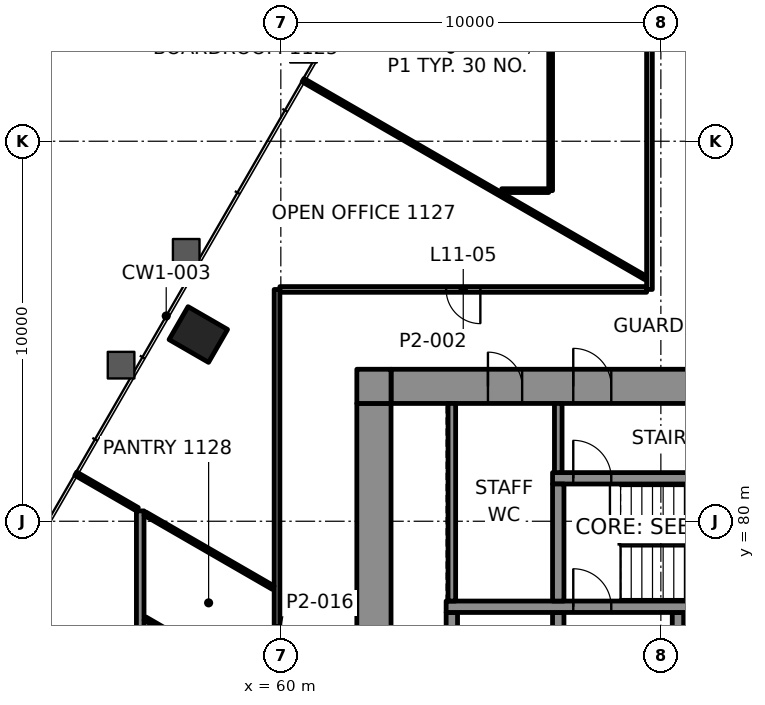
"""IFC4 building model, lengths in metres.
Left out: names, types, materials, properties, quantities, classifications, styles, units other than length and angle.
Written with IfcOpenShell. Run it as: python <this file> out.ifc"""

import sys

from ifc_helpers import new_model, si_unit, direction, frame, frame_2d, origin, origin_2d, place, context, subcontext, project, spatial, rectangle, extrude, element, fill, save


model = new_model("IFC4")
c1 = context("Model", 3, precision=1e-05, world=origin(), true_north=direction((0.0, 1.0)))
c2 = subcontext(c1, "Body", "Model", "MODEL_VIEW")
j1 = project(units=[si_unit("LENGTHUNIT", "METRE"), si_unit("PLANEANGLEUNIT", "RADIAN")], contexts=[c1])
p1 = place(None, origin())
s1 = spatial("IfcSite", under=j1, at=p1, CompositionType="ELEMENT")
p2 = place(p1, origin())
s2 = spatial("IfcBuilding", under=s1, at=p2, CompositionType="ELEMENT")
p3 = place(p2, frame((0.0, 0.0, 52.6)))
s3 = spatial("IfcBuildingStorey", under=s2, at=p3, CompositionType="ELEMENT", Elevation=52.6)
p4 = place(p3, frame((57.829, 84.914, -0.0), z_axis=(0.0, 0.0, 1.0), x_axis=(-0.5, -0.866025403784, 0.0)))
e1 = element("IfcColumn", 1, at=p4, inside=s3, PredefinedType="COLUMN", context=c2, shape_type="SweptSolid", body=[
    extrude(rectangle(XDim=1.0, YDim=1.2, at=origin_2d()), origin(), (0.0, 0.0, 1.0), 4.2),
])
p5 = place(p3, frame((62.9, 83.55, 0.0), z_axis=(0.0, 0.0, 1.0), x_axis=(1.0, 0.0, 0.0)))
e2 = element("IfcWall", 2, at=p5, inside=s3, PredefinedType="SHEAR", context=c2, shape_type="SweptSolid", body=[
    extrude(rectangle(XDim=25.1, YDim=0.9, at=frame_2d((12.55, 0.0))), origin(), (0.0, 0.0, 1.0), 4.0),
])
p6 = place(p5, frame((4.795, 0.0, 0.0)))
e3 = element("IfcOpeningElement", 3, at=p6, cuts=e2, PredefinedType="OPENING", context=c2, shape_type="SweptSolid", body=[
    extrude(rectangle(XDim=1.0, YDim=2.1, at=frame_2d((0.5, 1.05))), frame((0.0, 0.46, 0.0), z_axis=(0.0, -1.0, 0.0), x_axis=(1.0, 0.0, 0.0)), (0.0, 0.0, 1.0), 0.92),
])
p7 = place(p5, frame((18.605, 0.0, 0.0)))
e4 = element("IfcOpeningElement", 4, at=p7, cuts=e2, PredefinedType="OPENING", context=c2, shape_type="SweptSolid", body=[
    extrude(rectangle(XDim=1.0, YDim=2.1, at=frame_2d((0.5, 1.05))), frame((0.0, 0.46, 0.0), z_axis=(0.0, -1.0, 0.0), x_axis=(1.0, 0.0, 0.0)), (0.0, 0.0, 1.0), 0.92),
])
p8 = place(p5, frame((2.55, 0.0, 0.0)))
e5 = element("IfcOpeningElement", 5, at=p8, cuts=e2, PredefinedType="OPENING", context=c2, shape_type="SweptSolid", body=[
    extrude(rectangle(XDim=0.9, YDim=2.1, at=frame_2d((0.45, 1.05))), frame((0.0, 0.46, 0.0), z_axis=(0.0, -1.0, 0.0), x_axis=(1.0, 0.0, 0.0)), (0.0, 0.0, 1.0), 0.92),
])
p9 = place(p5, frame((11.75, 0.0, 0.0)))
e6 = element("IfcOpeningElement", 6, at=p9, cuts=e2, PredefinedType="OPENING", context=c2, shape_type="SweptSolid", body=[
    extrude(rectangle(XDim=0.9, YDim=2.1, at=frame_2d((0.45, 1.05))), frame((0.0, 0.46, 0.0), z_axis=(0.0, -1.0, 0.0), x_axis=(1.0, 0.0, 0.0)), (0.0, 0.0, 1.0), 0.92),
])
p10 = place(p5, frame((21.65, 0.0, 0.0)))
e7 = element("IfcOpeningElement", 7, at=p10, cuts=e2, PredefinedType="OPENING", context=c2, shape_type="SweptSolid", body=[
    extrude(rectangle(XDim=0.9, YDim=2.1, at=frame_2d((0.45, 1.05))), frame((0.0, 0.46, 0.0), z_axis=(0.0, -1.0, 0.0), x_axis=(1.0, 0.0, 0.0)), (0.0, 0.0, 1.0), 0.92),
])
p11 = place(p3, frame((62.45, 66.9, 0.0), z_axis=(0.0, 0.0, 1.0), x_axis=(0.0, 1.0, 0.0)))
e8 = element("IfcWall", 8, at=p11, inside=s3, PredefinedType="SHEAR", context=c2, shape_type="SweptSolid", body=[
    extrude(rectangle(XDim=16.2, YDim=0.9, at=frame_2d((8.1, 0.0))), origin(), (0.0, 0.0, 1.0), 4.0),
])
p12 = place(p11, frame((5.5, 0.0, 0.0)))
e9 = element("IfcOpeningElement", 9, at=p12, cuts=e8, PredefinedType="OPENING", context=c2, shape_type="SweptSolid", body=[
    extrude(rectangle(XDim=1.8, YDim=2.1, at=frame_2d((0.9, 1.05))), frame((0.0, 0.46, 0.0), z_axis=(0.0, -1.0, 0.0), x_axis=(1.0, 0.0, 0.0)), (0.0, 0.0, 1.0), 0.92),
])
for number, where, z_axis, x_axis in (
    (10, (64.5, 75.0, 0.0), (0.0, 0.0, 1.0), (0.0, 1.0, 0.0)),
    (11, (67.3, 75.0, 0.0), (0.0, 0.0, 1.0), (0.0, 1.0, 0.0)),
):
    element("IfcWall", number, at=place(p3, frame(where, z_axis=z_axis, x_axis=x_axis)), inside=s3, PredefinedType="SHEAR", context=c2, shape_type="SweptSolid", body=[
        extrude(rectangle(XDim=2.6, YDim=0.3, at=frame_2d((1.3, 0.0))), origin(), (0.0, 0.0, 1.0), 4.0),
    ])
p13 = place(p3, frame((70.45, 75.0, 0.0), z_axis=(0.0, 0.0, 1.0), x_axis=(0.0, 1.0, 0.0)))
e12 = element("IfcWall", 12, at=p13, inside=s3, PredefinedType="SHEAR", context=c2, shape_type="SweptSolid", body=[
    extrude(rectangle(XDim=2.6, YDim=0.3, at=frame_2d((1.3, 0.0))), origin(), (0.0, 0.0, 1.0), 4.0),
])
p14 = place(p13, frame((0.15, 0.0, 0.0)))
e13 = element("IfcOpeningElement", 13, at=p14, cuts=e12, PredefinedType="OPENING", context=c2, shape_type="SweptSolid", body=[
    extrude(rectangle(XDim=1.1, YDim=2.1, at=frame_2d((0.55, 1.05))), frame((0.0, 0.16, 0.0), z_axis=(0.0, -1.0, 0.0), x_axis=(1.0, 0.0, 0.0)), (0.0, 0.0, 1.0), 0.32),
])
p15 = place(p3, frame((64.35, 77.75, 0.0), z_axis=(0.0, 0.0, 1.0), x_axis=(1.0, 0.0, 0.0)))
e14 = element("IfcWall", 14, at=p15, inside=s3, PredefinedType="SHEAR", context=c2, shape_type="SweptSolid", body=[
    extrude(rectangle(XDim=22.75, YDim=0.3, at=frame_2d((11.375, 0.0))), origin(), (0.0, 0.0, 1.0), 4.0),
])
p16 = place(p15, frame((3.345, 0.0, 0.0)))
e15 = element("IfcOpeningElement", 15, at=p16, cuts=e14, PredefinedType="OPENING", context=c2, shape_type="SweptSolid", body=[
    extrude(rectangle(XDim=1.0, YDim=2.1, at=frame_2d((0.5, 1.05))), frame((0.0, 0.16, 0.0), z_axis=(0.0, -1.0, 0.0), x_axis=(1.0, 0.0, 0.0)), (0.0, 0.0, 1.0), 0.32),
])
p17 = place(p3, frame((67.15, 81.13, 0.0), z_axis=(0.0, 0.0, 1.0), x_axis=(1.0, 0.0, 0.0)))
e16 = element("IfcWall", 16, at=p17, inside=s3, PredefinedType="SHEAR", context=c2, shape_type="SweptSolid", body=[
    extrude(rectangle(XDim=6.91, YDim=0.3, at=frame_2d((3.455, 0.0))), origin(), (0.0, 0.0, 1.0), 4.0),
])
p18 = place(p17, frame((0.545, 0.0, 0.0)))
e17 = element("IfcOpeningElement", 17, at=p18, cuts=e16, PredefinedType="OPENING", context=c2, shape_type="SweptSolid", body=[
    extrude(rectangle(XDim=1.0, YDim=2.1, at=frame_2d((0.5, 1.05))), frame((0.0, 0.16, 0.0), z_axis=(0.0, -1.0, 0.0), x_axis=(1.0, 0.0, 0.0)), (0.0, 0.0, 1.0), 0.32),
])
p19 = place(p3, frame((67.3, 77.9, 0.0), z_axis=(0.0, 0.0, 1.0), x_axis=(0.0, 1.0, 0.0)))
e18 = element("IfcWall", 18, at=p19, inside=s3, PredefinedType="SHEAR", context=c2, shape_type="SweptSolid", body=[
    extrude(rectangle(XDim=3.08, YDim=0.3, at=frame_2d((1.54, 0.0))), origin(), (0.0, 0.0, 1.0), 4.0),
])
p20 = place(p3, frame((62.0, 83.55, 0.0), z_axis=(0.0, 0.0, 1.0), x_axis=(1.0, 0.0, 0.0)))
e19 = element("IfcWall", 19, at=p20, inside=s3, PredefinedType="SHEAR", context=c2, shape_type="SweptSolid", body=[
    extrude(rectangle(XDim=0.9, YDim=0.9, at=frame_2d((0.45, 0.0))), origin(), (0.0, 0.0, 1.0), 4.0),
])
p21 = place(p3, frame((69.625, 86.1, 0.0), z_axis=(0.0, 0.0, 1.0), x_axis=(-1.0, 0.0, 0.0)))
e20 = element("IfcWall", 20, at=p21, inside=s3, PredefinedType="PARTITIONING", context=c2, shape_type="SweptSolid", body=[
    extrude(rectangle(XDim=9.649, YDim=0.15, at=frame_2d((4.825, 0.0))), origin(), (0.0, 0.0, 1.0), 3.4),
])
p22 = place(p21, frame((4.375, 0.0, 0.0)))
e21 = element("IfcOpeningElement", 21, at=p22, cuts=e20, PredefinedType="OPENING", context=c2, shape_type="SweptSolid", body=[
    extrude(rectangle(XDim=0.9, YDim=2.1, at=frame_2d((0.45, 1.05))), frame((0.0, 0.085, 0.0), z_axis=(0.0, -1.0, 0.0), x_axis=(1.0, 0.0, 0.0)), (0.0, 0.0, 1.0), 0.17),
])
p23 = place(p3, frame((65.812, 88.7, 0.0), z_axis=(0.0, 0.0, 1.0), x_axis=(1.0, 0.0, 0.0)))
e22 = element("IfcWall", 22, at=p23, inside=s3, PredefinedType="PARTITIONING", context=c2, shape_type="SweptSolid", body=[
    extrude(rectangle(XDim=1.238, YDim=0.1, at=frame_2d((0.619, 0.0))), origin(), (0.0, 0.0, 1.0), 3.4),
])
p24 = place(p3, frame((69.7, 86.1, 0.0), z_axis=(0.0, 0.0, 1.0), x_axis=(0.0, 1.0, 0.0)))
e23 = element("IfcWall", 23, at=p24, inside=s3, PredefinedType="PARTITIONING", context=c2, shape_type="SweptSolid", body=[
    extrude(rectangle(XDim=10.6, YDim=0.15, at=frame_2d((5.3, 0.0))), origin(), (0.0, 0.0, 1.0), 3.4),
])
p25 = place(p3, frame((67.1, 88.7, 0.0), z_axis=(0.0, 0.0, 1.0), x_axis=(0.0, 1.0, 0.0)))
e24 = element("IfcWall", 24, at=p25, inside=s3, PredefinedType="PARTITIONING", context=c2, shape_type="SweptSolid", body=[
    extrude(rectangle(XDim=10.6, YDim=0.1, at=frame_2d((5.3, 0.0))), origin(), (0.0, 0.0, 1.0), 3.4),
])
p26 = place(p3, frame((59.9, 67.321, 0.0), z_axis=(0.0, 0.0, 1.0), x_axis=(0.0, 1.0, 0.0)))
e25 = element("IfcWall", 25, at=p26, inside=s3, PredefinedType="PARTITIONING", context=c2, shape_type="SweptSolid", body=[
    extrude(rectangle(XDim=18.778, YDim=0.15, at=frame_2d((9.389, 0.0))), origin(), (0.0, 0.0, 1.0), 3.4),
])
p27 = place(p26, frame((3.519, 0.0, 0.0)))
e26 = element("IfcOpeningElement", 26, at=p27, cuts=e25, PredefinedType="OPENING", context=c2, shape_type="SweptSolid", body=[
    extrude(rectangle(XDim=0.9, YDim=2.1, at=frame_2d((0.45, 1.05))), frame((0.0, 0.085, 0.0), z_axis=(0.0, -1.0, 0.0), x_axis=(1.0, 0.0, 0.0)), (0.0, 0.0, 1.0), 0.17),
])
p28 = place(p26, frame((6.281, 0.0, 0.0)))
e27 = element("IfcOpeningElement", 27, at=p28, cuts=e25, PredefinedType="OPENING", context=c2, shape_type="SweptSolid", body=[
    extrude(rectangle(XDim=0.9, YDim=2.1, at=frame_2d((0.45, 1.05))), frame((0.0, 0.085, 0.0), z_axis=(0.0, -1.0, 0.0), x_axis=(1.0, 0.0, 0.0)), (0.0, 0.0, 1.0), 0.17),
])
p29 = place(p26, frame((9.042, 0.0, 0.0)))
e28 = element("IfcOpeningElement", 28, at=p29, cuts=e25, PredefinedType="OPENING", context=c2, shape_type="SweptSolid", body=[
    extrude(rectangle(XDim=0.9, YDim=2.1, at=frame_2d((0.45, 1.05))), frame((0.0, 0.085, 0.0), z_axis=(0.0, -1.0, 0.0), x_axis=(1.0, 0.0, 0.0)), (0.0, 0.0, 1.0), 0.17),
])
p30 = place(p3, frame((56.3, 71.988, 0.0), z_axis=(0.0, 0.0, 1.0), x_axis=(0.0, 1.0, 0.0)))
e29 = element("IfcWall", 29, at=p30, inside=s3, PredefinedType="PARTITIONING", context=c2, shape_type="SweptSolid", body=[
    extrude(rectangle(XDim=8.284, YDim=0.2, at=frame_2d((4.142, 0.0))), origin(), (0.0, 0.0, 1.0), 3.4),
])
p31 = place(p3, frame((69.599, 86.404, 0.0), z_axis=(0.0, 0.0, 1.0), x_axis=(-0.866034815185, 0.499983698621, 0.0)))
e30 = element("IfcWall", 30, at=p31, inside=s3, PredefinedType="PARTITIONING", context=c2, shape_type="SweptSolid", body=[
    extrude(rectangle(XDim=10.408, YDim=0.1, at=frame_2d((5.204, 0.0))), origin(), (0.0, 0.0, 1.0), 3.165),
])
p32 = place(p3, frame((59.799, 78.252, 0.0), z_axis=(0.0, 0.0, 1.0), x_axis=(-0.866036349784, 0.499981040493, 0.0)))
e31 = element("IfcWall", 31, at=p32, inside=s3, PredefinedType="PARTITIONING", context=c2, shape_type="SweptSolid", body=[
    extrude(rectangle(XDim=3.896, YDim=0.1, at=frame_2d((1.948, 0.0))), origin(), (0.0, 0.0, 1.0), 3.4),
])
p33 = place(p3, frame((59.799, 75.49, 0.0), z_axis=(0.0, 0.0, 1.0), x_axis=(-0.866043624834, 0.499968438888, 0.0)))
e32 = element("IfcWall", 32, at=p33, inside=s3, PredefinedType="PARTITIONING", context=c2, shape_type="SweptSolid", body=[
    extrude(rectangle(XDim=3.895, YDim=0.1, at=frame_2d((1.947, 0.0))), origin(), (0.0, 0.0, 1.0), 3.4),
])
p34 = place(p3, frame((56.225, 80.316, 0.0), z_axis=(0.0, 0.0, 1.0), x_axis=(-0.86600952399, 0.500027503603, 0.0)))
e33 = element("IfcWall", 33, at=p34, inside=s3, PredefinedType="PARTITIONING", context=c2, shape_type="SweptSolid", body=[
    extrude(rectangle(XDim=1.871, YDim=0.1, at=frame_2d((0.935, 0.0))), origin(), (0.0, 0.0, 1.0), 3.165),
])
p35 = place(p3, frame((64.5, 77.9, 0.0), z_axis=(0.0, 0.0, 1.0), x_axis=(0.0, 1.0, 0.0)))
e34 = element("IfcWall", 34, at=p35, inside=s3, PredefinedType="PARTITIONING", context=c2, shape_type="SweptSolid", body=[
    extrude(rectangle(XDim=5.2, YDim=0.2, at=frame_2d((2.6, 0.0))), origin(), (0.0, 0.0, 1.0), 4.0),
])
p36 = place(p3, frame((67.3, 81.28, 0.0), z_axis=(0.0, 0.0, 1.0), x_axis=(0.0, 1.0, 0.0)))
e35 = element("IfcWall", 35, at=p36, inside=s3, PredefinedType="PARTITIONING", context=c2, shape_type="SweptSolid", body=[
    extrude(rectangle(XDim=1.82, YDim=0.2, at=frame_2d((0.91, 0.0))), origin(), (0.0, 0.0, 1.0), 4.0),
])
p37 = place(p22, origin())
e36 = element("IfcDoor", 36, at=p37, inside=s3, OperationType="SINGLE_SWING_LEFT", PredefinedType="DOOR", context=c2, shape_type="SweptSolid", body=[
    extrude(rectangle(XDim=0.9, YDim=2.1, at=frame_2d((0.45, 1.05))), frame((0.0, 0.025, 0.0), z_axis=(0.0, -1.0, 0.0), x_axis=(1.0, 0.0, 0.0)), (0.0, 0.0, 1.0), 0.05),
])
fill(e21, e36)
p38 = place(p16, origin())
e37 = element("IfcDoor", 37, at=p38, inside=s3, OperationType="SINGLE_SWING_LEFT", PredefinedType="DOOR", context=c2, shape_type="SweptSolid", body=[
    extrude(rectangle(XDim=1.0, YDim=2.1, at=frame_2d((0.5, 1.05))), frame((0.0, 0.025, 0.0), z_axis=(0.0, -1.0, 0.0), x_axis=(1.0, 0.0, 0.0)), (0.0, 0.0, 1.0), 0.05),
])
fill(e15, e37)
p39 = place(p18, origin())
e38 = element("IfcDoor", 38, at=p39, inside=s3, OperationType="SINGLE_SWING_RIGHT", PredefinedType="DOOR", context=c2, shape_type="SweptSolid", body=[
    extrude(rectangle(XDim=1.0, YDim=2.1, at=frame_2d((0.5, 1.05))), frame((0.0, 0.025, 0.0), z_axis=(0.0, -1.0, 0.0), x_axis=(1.0, 0.0, 0.0)), (0.0, 0.0, 1.0), 0.05),
])
fill(e17, e38)
p40 = place(p6, origin())
e39 = element("IfcDoor", 39, at=p40, inside=s3, OperationType="SINGLE_SWING_LEFT", PredefinedType="DOOR", context=c2, shape_type="SweptSolid", body=[
    extrude(rectangle(XDim=1.0, YDim=2.1, at=frame_2d((0.5, 1.05))), frame((0.0, 0.17, 0.0), z_axis=(0.0, -1.0, 0.0), x_axis=(1.0, 0.0, 0.0)), (0.0, 0.0, 1.0), 0.34),
])
fill(e3, e39)
p41 = place(p8, origin())
e40 = element("IfcDoor", 40, at=p41, inside=s3, OperationType="SINGLE_SWING_RIGHT", PredefinedType="DOOR", context=c2, shape_type="SweptSolid", body=[
    extrude(rectangle(XDim=0.9, YDim=2.1, at=frame_2d((0.45, 1.05))), frame((0.0, 0.17, 0.0), z_axis=(0.0, -1.0, 0.0), x_axis=(1.0, 0.0, 0.0)), (0.0, 0.0, 1.0), 0.34),
])
fill(e5, e40)
save(model, sys.argv[1])
